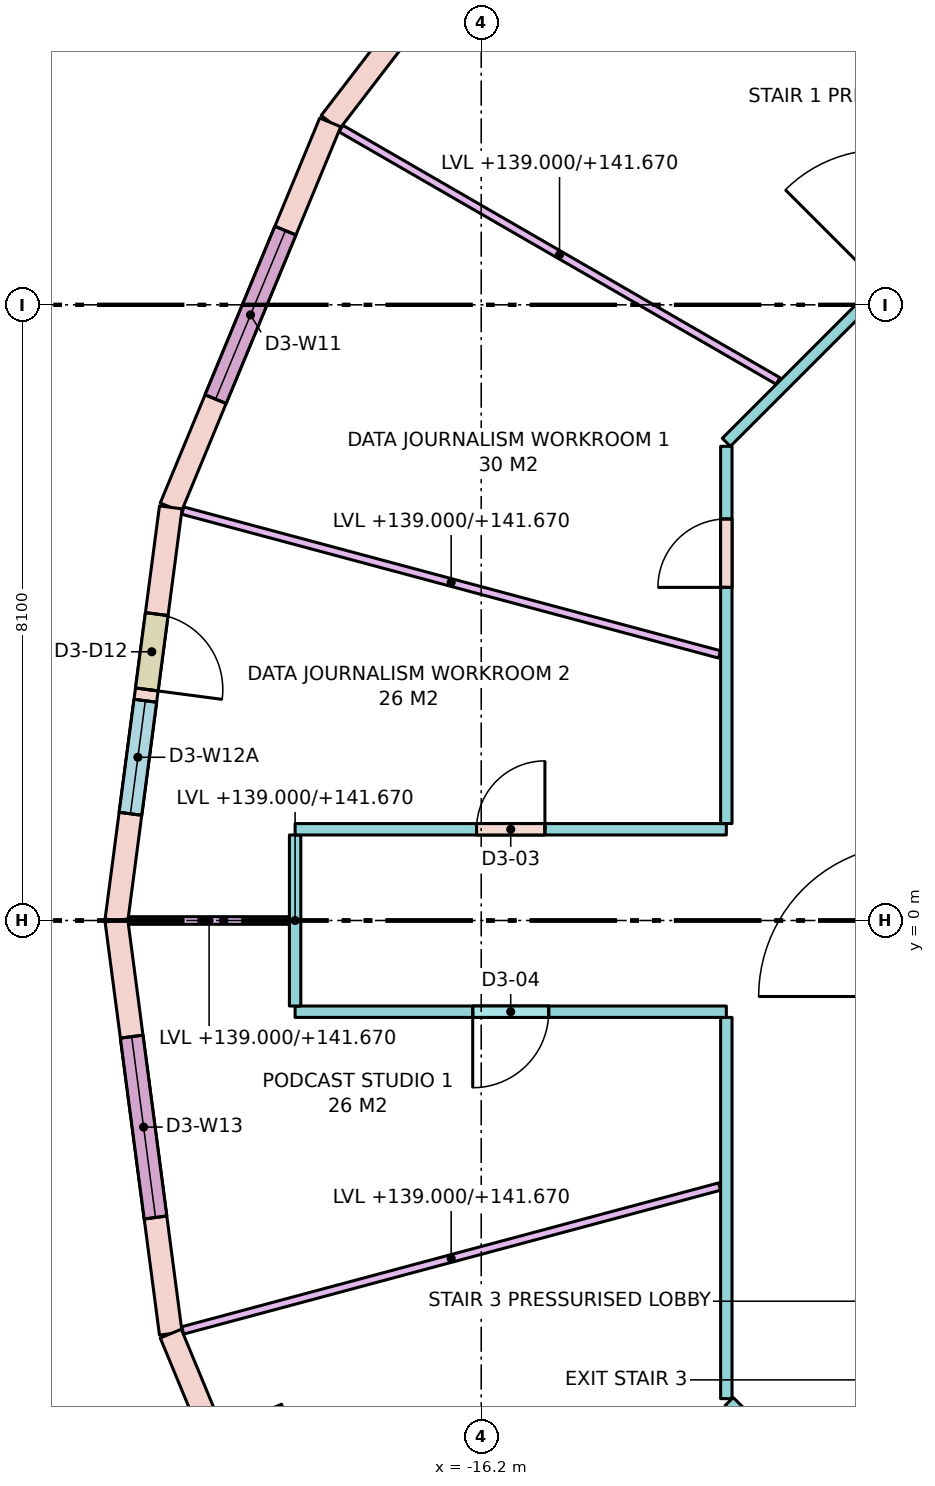
"""IFC4 building model, lengths in metres.
Left out: names, types, materials, properties, quantities, classifications, styles, units other than length and angle.
Written with IfcOpenShell. Run it as: python <this file> out.ifc"""

import sys

from ifc_helpers import new_model, si_unit, direction, frame, frame_2d, origin, place, context, subcontext, project, spatial, rectangle, extrude, element, fill, save


model = new_model("IFC4")
c1 = context("Model", 3, precision=1e-05, world=origin(), true_north=direction((0.0, 1.0)))
c2 = subcontext(c1, "Body", "Model", "MODEL_VIEW")
j1 = project(units=[si_unit("LENGTHUNIT", "METRE"), si_unit("PLANEANGLEUNIT", "RADIAN")], contexts=[c1])
p1 = place(None, origin())
s1 = spatial("IfcSite", under=j1, at=p1, CompositionType="ELEMENT")
p2 = place(p1, origin())
s2 = spatial("IfcBuilding", under=s1, at=p2, CompositionType="ELEMENT")
p3 = place(p2, frame((0.0, 0.0, 139.0)))
s3 = spatial("IfcBuildingStorey", under=s2, at=p3, CompositionType="ELEMENT", Elevation=139.0)
p4 = place(p3, frame((-14.849, 14.849, 0.0), z_axis=(0.0, 0.0, 1.0), x_axis=(-0.608784891166, -0.793335336593, 0.0)))
e1 = element("IfcWall", 1, at=p4, inside=s3, PredefinedType="STANDARD", context=c2, shape_type="SweptSolid", body=[
    extrude(rectangle(XDim=5.482, YDim=0.3, at=frame_2d((2.741, 0.0))), origin(), (0.0, 0.0, 1.0), 3.52),
])
p5 = place(p4, frame((1.416, 0.0, 0.0)))
e2 = element("IfcOpeningElement", 2, at=p5, cuts=e1, PredefinedType="OPENING", context=c2, shape_type="SweptSolid", body=[
    extrude(rectangle(XDim=1.0, YDim=2.4, at=frame_2d((0.5, 1.2))), frame((0.0, 0.16, 0.0), z_axis=(0.0, -1.0, 0.0), x_axis=(1.0, 0.0, 0.0)), (0.0, 0.0, 1.0), 0.32),
])
p6 = place(p4, frame((2.566, 0.0, 0.8)))
e3 = element("IfcOpeningElement", 3, at=p6, cuts=e1, PredefinedType="OPENING", context=c2, shape_type="SweptSolid", body=[
    extrude(rectangle(XDim=1.5, YDim=2.5, at=frame_2d((0.75, 1.25))), frame((0.0, 0.16, 0.0), z_axis=(0.0, -1.0, 0.0), x_axis=(1.0, 0.0, 0.0)), (0.0, 0.0, 1.0), 0.32),
])
p7 = place(p3, frame((-18.187, 10.5, 0.0), z_axis=(0.0, 0.0, 1.0), x_axis=(-0.382688740813, -0.923877333662, 0.0)))
e4 = element("IfcWall", 4, at=p7, inside=s3, PredefinedType="STANDARD", context=c2, shape_type="SweptSolid", body=[
    extrude(rectangle(XDim=5.482, YDim=0.3, at=frame_2d((2.741, 0.0))), origin(), (0.0, 0.0, 1.0), 3.52),
])
p8 = place(p7, frame((1.541, 0.0, 0.8)))
e5 = element("IfcOpeningElement", 5, at=p8, cuts=e4, PredefinedType="OPENING", context=c2, shape_type="SweptSolid", body=[
    extrude(rectangle(XDim=2.4, YDim=2.5, at=frame_2d((1.2, 1.25))), frame((0.0, 0.16, 0.0), z_axis=(0.0, -1.0, 0.0), x_axis=(1.0, 0.0, 0.0)), (0.0, 0.0, 1.0), 0.32),
])
p9 = place(p3, frame((-20.284, 5.435, 0.0), z_axis=(0.0, 0.0, 1.0), x_axis=(-0.130527087244, -0.991444743541, 0.0)))
e6 = element("IfcWall", 6, at=p9, inside=s3, PredefinedType="STANDARD", context=c2, shape_type="SweptSolid", body=[
    extrude(rectangle(XDim=5.482, YDim=0.3, at=frame_2d((2.741, 0.0))), origin(), (0.0, 0.0, 1.0), 3.52),
])
p10 = place(p9, frame((1.416, 0.0, 0.0)))
e7 = element("IfcOpeningElement", 7, at=p10, cuts=e6, PredefinedType="OPENING", context=c2, shape_type="SweptSolid", body=[
    extrude(rectangle(XDim=1.0, YDim=2.4, at=frame_2d((0.5, 1.2))), frame((0.0, 0.16, 0.0), z_axis=(0.0, -1.0, 0.0), x_axis=(1.0, 0.0, 0.0)), (0.0, 0.0, 1.0), 0.32),
])
p11 = place(p9, frame((2.566, 0.0, 0.8)))
e8 = element("IfcOpeningElement", 8, at=p11, cuts=e6, PredefinedType="OPENING", context=c2, shape_type="SweptSolid", body=[
    extrude(rectangle(XDim=1.5, YDim=2.5, at=frame_2d((0.75, 1.25))), frame((0.0, 0.16, 0.0), z_axis=(0.0, -1.0, 0.0), x_axis=(1.0, 0.0, 0.0)), (0.0, 0.0, 1.0), 0.32),
])
p12 = place(p3, frame((-21.0, 0.0, 0.0), z_axis=(0.0, 0.0, 1.0), x_axis=(0.130527087244, -0.991444743541, 0.0)))
e9 = element("IfcWall", 9, at=p12, inside=s3, PredefinedType="STANDARD", context=c2, shape_type="SweptSolid", body=[
    extrude(rectangle(XDim=5.482, YDim=0.3, at=frame_2d((2.741, 0.0))), origin(), (0.0, 0.0, 1.0), 3.52),
])
p13 = place(p12, frame((1.541, 0.0, 0.8)))
e10 = element("IfcOpeningElement", 10, at=p13, cuts=e9, PredefinedType="OPENING", context=c2, shape_type="SweptSolid", body=[
    extrude(rectangle(XDim=2.4, YDim=2.5, at=frame_2d((1.2, 1.25))), frame((0.0, 0.16, 0.0), z_axis=(0.0, -1.0, 0.0), x_axis=(1.0, 0.0, 0.0)), (0.0, 0.0, 1.0), 0.32),
])
p14 = place(p3, frame((-20.284, -5.435, 0.0), z_axis=(0.0, 0.0, 1.0), x_axis=(0.382688740813, -0.923877333662, 0.0)))
e11 = element("IfcWall", 11, at=p14, inside=s3, PredefinedType="STANDARD", context=c2, shape_type="SweptSolid", body=[
    extrude(rectangle(XDim=5.482, YDim=0.3, at=frame_2d((2.741, 0.0))), origin(), (0.0, 0.0, 1.0), 3.52),
])
p15 = place(p14, frame((1.416, 0.0, 0.0)))
e12 = element("IfcOpeningElement", 12, at=p15, cuts=e11, PredefinedType="OPENING", context=c2, shape_type="SweptSolid", body=[
    extrude(rectangle(XDim=1.0, YDim=2.4, at=frame_2d((0.5, 1.2))), frame((0.0, 0.16, 0.0), z_axis=(0.0, -1.0, 0.0), x_axis=(1.0, 0.0, 0.0)), (0.0, 0.0, 1.0), 0.32),
])
p16 = place(p14, frame((2.566, 0.0, 0.8)))
e13 = element("IfcOpeningElement", 13, at=p16, cuts=e11, PredefinedType="OPENING", context=c2, shape_type="SweptSolid", body=[
    extrude(rectangle(XDim=1.5, YDim=2.5, at=frame_2d((0.75, 1.25))), frame((0.0, 0.16, 0.0), z_axis=(0.0, -1.0, 0.0), x_axis=(1.0, 0.0, 0.0)), (0.0, 0.0, 1.0), 0.32),
])
p17 = place(p3, frame((-10.534, -8.731, 0.0), z_axis=(0.0, 0.0, 1.0), x_axis=(-0.707106781187, 0.707106781187, 0.0)))
e14 = element("IfcWall", 14, at=p17, inside=s3, PredefinedType="PARTITIONING", context=c2, shape_type="SweptSolid", body=[
    extrude(rectangle(XDim=3.399, YDim=0.15, at=frame_2d((1.7, 0.0))), origin(), (0.0, 0.0, 1.0), 2.67),
])
p18 = place(p3, frame((-12.975, -6.291, 0.0), z_axis=(0.0, 0.0, 1.0), x_axis=(0.0, 1.0, 0.0)))
e15 = element("IfcWall", 15, at=p18, inside=s3, PredefinedType="PARTITIONING", context=c2, shape_type="SweptSolid", body=[
    extrude(rectangle(XDim=5.016, YDim=0.15, at=frame_2d((2.508, 0.0))), origin(), (0.0, 0.0, 1.0), 2.67),
])
p19 = place(p3, frame((-12.975, -1.2, 0.0), z_axis=(0.0, 0.0, 1.0), x_axis=(-1.0, 0.0, 0.0)))
e16 = element("IfcWall", 16, at=p19, inside=s3, PredefinedType="PARTITIONING", context=c2, shape_type="SweptSolid", body=[
    extrude(rectangle(XDim=5.674, YDim=0.15, at=frame_2d((2.837, 0.0))), origin(), (0.0, 0.0, 1.0), 3.52),
])
p20 = place(p19, frame((2.337, 0.0, 0.0)))
e17 = element("IfcOpeningElement", 17, at=p20, cuts=e16, PredefinedType="OPENING", context=c2, shape_type="SweptSolid", body=[
    extrude(rectangle(XDim=1.0, YDim=2.1, at=frame_2d((0.5, 1.05))), frame((0.0, 0.085, 0.0), z_axis=(0.0, -1.0, 0.0), x_axis=(1.0, 0.0, 0.0)), (0.0, 0.0, 1.0), 0.17),
])
p21 = place(p3, frame((-18.649, -1.125, 0.0), z_axis=(0.0, 0.0, 1.0), x_axis=(0.0, 1.0, 0.0)))
e18 = element("IfcWall", 18, at=p21, inside=s3, PredefinedType="PARTITIONING", context=c2, shape_type="SweptSolid", body=[
    extrude(rectangle(XDim=2.25, YDim=0.15, at=frame_2d((1.125, 0.0))), origin(), (0.0, 0.0, 1.0), 2.67),
])
p22 = place(p3, frame((-18.649, 1.2, 0.0), z_axis=(0.0, 0.0, 1.0), x_axis=(1.0, 0.0, 0.0)))
e19 = element("IfcWall", 19, at=p22, inside=s3, PredefinedType="PARTITIONING", context=c2, shape_type="SweptSolid", body=[
    extrude(rectangle(XDim=5.674, YDim=0.15, at=frame_2d((2.837, 0.0))), origin(), (0.0, 0.0, 1.0), 3.52),
])
p23 = place(p22, frame((2.387, 0.0, 0.0)))
e20 = element("IfcOpeningElement", 20, at=p23, cuts=e19, PredefinedType="OPENING", context=c2, shape_type="SweptSolid", body=[
    extrude(rectangle(XDim=0.9, YDim=2.1, at=frame_2d((0.45, 1.05))), frame((0.0, 0.085, 0.0), z_axis=(0.0, -1.0, 0.0), x_axis=(1.0, 0.0, 0.0)), (0.0, 0.0, 1.0), 0.17),
])
p24 = place(p3, frame((-12.975, 1.275, 0.0), z_axis=(0.0, 0.0, 1.0), x_axis=(0.0, 1.0, 0.0)))
e21 = element("IfcWall", 21, at=p24, inside=s3, PredefinedType="PARTITIONING", context=c2, shape_type="SweptSolid", body=[
    extrude(rectangle(XDim=4.963, YDim=0.15, at=frame_2d((2.482, 0.0))), origin(), (0.0, 0.0, 1.0), 2.67),
])
p25 = place(p24, frame((3.107, 0.0, 0.0)))
e22 = element("IfcOpeningElement", 22, at=p25, cuts=e21, PredefinedType="OPENING", context=c2, shape_type="SweptSolid", body=[
    extrude(rectangle(XDim=0.9, YDim=2.1, at=frame_2d((0.45, 1.05))), frame((0.0, 0.085, 0.0), z_axis=(0.0, -1.0, 0.0), x_axis=(1.0, 0.0, 0.0)), (0.0, 0.0, 1.0), 0.17),
])
p26 = place(p3, frame((-12.975, 6.291, 0.0), z_axis=(0.0, 0.0, 1.0), x_axis=(0.707125355289, 0.707088206597, 0.0)))
e23 = element("IfcWall", 23, at=p26, inside=s3, PredefinedType="PARTITIONING", context=c2, shape_type="SweptSolid", body=[
    extrude(rectangle(XDim=6.572, YDim=0.15, at=frame_2d((3.286, 0.0))), origin(), (0.0, 0.0, 1.0), 2.67),
])
p27 = place(p26, frame((2.898, 0.0, 0.0)))
e24 = element("IfcOpeningElement", 24, at=p27, cuts=e23, PredefinedType="OPENING", context=c2, shape_type="SweptSolid", body=[
    extrude(rectangle(XDim=1.8, YDim=2.1, at=frame_2d((0.9, 1.05))), frame((0.0, 0.085, 0.0), z_axis=(0.0, -1.0, 0.0), x_axis=(1.0, 0.0, 0.0)), (0.0, 0.0, 1.0), 0.17),
])
p28 = place(p3, frame((-12.294, 7.098, 0.0), z_axis=(0.0, 0.0, 1.0), x_axis=(-0.866010486135, 0.500025837236, 0.0)))
e25 = element("IfcWall", 25, at=p28, inside=s3, PredefinedType="PARTITIONING", context=c2, shape_type="SweptSolid", body=[
    extrude(rectangle(XDim=6.641, YDim=0.1, at=frame_2d((3.32, 0.0))), origin(), (0.0, 0.0, 1.0), 2.67),
])
p29 = place(p3, frame((-13.064, 3.5, 0.0), z_axis=(0.0, 0.0, 1.0), x_axis=(-0.965927781613, 0.258811747624, 0.0)))
e26 = element("IfcWall", 26, at=p29, inside=s3, PredefinedType="PARTITIONING", context=c2, shape_type="SweptSolid", body=[
    extrude(rectangle(XDim=7.312, YDim=0.1, at=frame_2d((3.656, 0.0))), origin(), (0.0, 0.0, 1.0), 2.67),
])
p30 = place(p3, frame((-18.724, 0.0, 0.0), z_axis=(0.0, 0.0, 1.0), x_axis=(-1.0, 0.0, 0.0)))
e27 = element("IfcWall", 27, at=p30, inside=s3, PredefinedType="PARTITIONING", context=c2, shape_type="SweptSolid", body=[
    extrude(rectangle(XDim=2.113, YDim=0.1, at=frame_2d((1.057, 0.0))), origin(), (0.0, 0.0, 1.0), 2.67),
])
p31 = place(p3, frame((-13.064, -3.5, 0.0), z_axis=(0.0, 0.0, 1.0), x_axis=(-0.965927781613, -0.258811747624, 0.0)))
e28 = element("IfcWall", 28, at=p31, inside=s3, PredefinedType="PARTITIONING", context=c2, shape_type="SweptSolid", body=[
    extrude(rectangle(XDim=7.312, YDim=0.1, at=frame_2d((3.656, 0.0))), origin(), (0.0, 0.0, 1.0), 2.67),
])
p32 = place(p8, origin())
e29 = element("IfcWindow", 29, at=p32, inside=s3, PartitioningType="SINGLE_PANEL", PredefinedType="WINDOW", context=c2, shape_type="SweptSolid", body=[
    extrude(rectangle(XDim=2.4, YDim=2.5, at=frame_2d((1.2, 1.25))), frame((0.0, 0.03, 0.0), z_axis=(0.0, -1.0, 0.0), x_axis=(1.0, 0.0, 0.0)), (0.0, 0.0, 1.0), 0.06),
])
fill(e5, e29)
p33 = place(p10, origin())
e30 = element("IfcDoor", 30, at=p33, inside=s3, OperationType="SINGLE_SWING_RIGHT", PredefinedType="DOOR", context=c2, shape_type="SweptSolid", body=[
    extrude(rectangle(XDim=1.0, YDim=2.4, at=frame_2d((0.5, 1.2))), frame((0.0, 0.025, 0.0), z_axis=(0.0, -1.0, 0.0), x_axis=(1.0, 0.0, 0.0)), (0.0, 0.0, 1.0), 0.05),
])
fill(e7, e30)
p34 = place(p11, origin())
e31 = element("IfcWindow", 31, at=p34, inside=s3, PartitioningType="SINGLE_PANEL", PredefinedType="WINDOW", context=c2, shape_type="SweptSolid", body=[
    extrude(rectangle(XDim=1.5, YDim=2.5, at=frame_2d((0.75, 1.25))), frame((0.0, 0.03, 0.0), z_axis=(0.0, -1.0, 0.0), x_axis=(1.0, 0.0, 0.0)), (0.0, 0.0, 1.0), 0.06),
])
fill(e8, e31)
p35 = place(p13, origin())
e32 = element("IfcWindow", 32, at=p35, inside=s3, PartitioningType="SINGLE_PANEL", PredefinedType="WINDOW", context=c2, shape_type="SweptSolid", body=[
    extrude(rectangle(XDim=2.4, YDim=2.5, at=frame_2d((1.2, 1.25))), frame((0.0, 0.03, 0.0), z_axis=(0.0, -1.0, 0.0), x_axis=(1.0, 0.0, 0.0)), (0.0, 0.0, 1.0), 0.06),
])
fill(e10, e32)
p36 = place(p25, origin())
e33 = element("IfcDoor", 33, at=p36, inside=s3, OperationType="SINGLE_SWING_LEFT", PredefinedType="DOOR", context=c2, shape_type="SweptSolid", body=[
    extrude(rectangle(XDim=0.9, YDim=2.1, at=frame_2d((0.45, 1.05))), frame((0.0, 0.025, 0.0), z_axis=(0.0, -1.0, 0.0), x_axis=(1.0, 0.0, 0.0)), (0.0, 0.0, 1.0), 0.05),
])
fill(e22, e33)
p37 = place(p23, origin())
e34 = element("IfcDoor", 34, at=p37, inside=s3, OperationType="SINGLE_SWING_RIGHT", PredefinedType="DOOR", context=c2, shape_type="SweptSolid", body=[
    extrude(rectangle(XDim=0.9, YDim=2.1, at=frame_2d((0.45, 1.05))), frame((0.0, 0.025, 0.0), z_axis=(0.0, -1.0, 0.0), x_axis=(1.0, 0.0, 0.0)), (0.0, 0.0, 1.0), 0.05),
])
fill(e20, e34)
p38 = place(p20, origin())
e35 = element("IfcDoor", 35, at=p38, inside=s3, OperationType="SINGLE_SWING_RIGHT", PredefinedType="DOOR", context=c2, shape_type="SweptSolid", body=[
    extrude(rectangle(XDim=1.0, YDim=2.1, at=frame_2d((0.5, 1.05))), frame((0.0, 0.025, 0.0), z_axis=(0.0, -1.0, 0.0), x_axis=(1.0, 0.0, 0.0)), (0.0, 0.0, 1.0), 0.05),
])
fill(e17, e35)
save(model, sys.argv[1])
